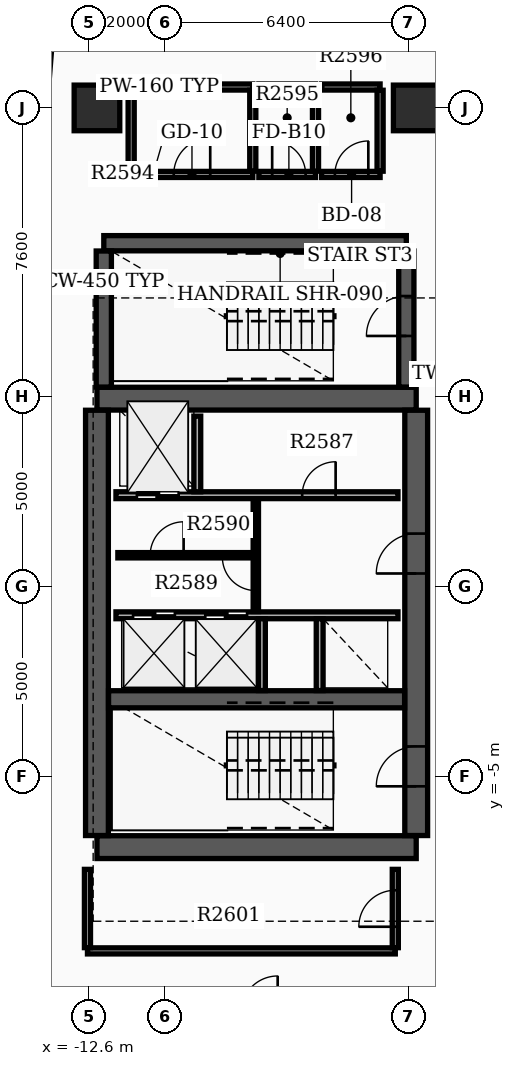
"""IFC4 building model, lengths in metres.
Left out: names, types, materials, properties, quantities, classifications, styles, units other than length and angle.
Written with IfcOpenShell. Run it as: python <this file> out.ifc"""

import sys

from ifc_helpers import new_model, si_unit, direction, frame, frame_2d, origin, origin_2d, place, context, subcontext, project, spatial, rectangle, extrude, element, fill, save


model = new_model("IFC4")
c1 = context("Model", 3, precision=1e-05, world=origin(), true_north=direction((0.0, 1.0)))
c2 = subcontext(c1, "Body", "Model", "MODEL_VIEW")
j1 = project(units=[si_unit("LENGTHUNIT", "METRE"), si_unit("PLANEANGLEUNIT", "RADIAN")], contexts=[c1])
p1 = place(None, origin())
s1 = spatial("IfcSite", under=j1, at=p1, CompositionType="ELEMENT")
p2 = place(p1, origin())
s2 = spatial("IfcBuilding", under=s1, at=p2, CompositionType="ELEMENT")
p3 = place(p2, frame((0.0, 0.0, 164.4)))
s3 = spatial("IfcBuildingStorey", under=s2, at=p3, CompositionType="ELEMENT", Elevation=164.4)
for number, where, z_axis, x_axis in (
    (1, (-12.4, -6.85, 0.0), (0.0, 0.0, 1.0), (1.0, 0.0, 0.0)),
    (2, (-12.4, 4.95, 0.0), (0.0, 0.0, 1.0), (1.0, 0.0, 0.0)),
):
    element("IfcWall", number, at=place(p3, frame(where, z_axis=z_axis, x_axis=x_axis)), inside=s3, PredefinedType="SHEAR", context=c2, shape_type="SweptSolid", body=[
        extrude(rectangle(XDim=8.4, YDim=0.6, at=frame_2d((4.2, 0.0))), origin(), (0.0, 0.0, 1.0), 3.7),
    ])
p4 = place(p3, frame((-12.4, -6.545, 0.0), z_axis=(0.0, 0.0, 1.0), x_axis=(0.0, 1.0, 0.0)))
e3 = element("IfcWall", 3, at=p4, inside=s3, PredefinedType="SHEAR", context=c2, shape_type="SweptSolid", body=[
    extrude(rectangle(XDim=11.19, YDim=0.6, at=frame_2d((5.595, 0.0))), origin(), (0.0, 0.0, 1.0), 3.7),
])
p5 = place(p3, frame((-4.0, -6.545, 0.0), z_axis=(0.0, 0.0, 1.0), x_axis=(0.0, 1.0, 0.0)))
e4 = element("IfcWall", 4, at=p5, inside=s3, PredefinedType="SHEAR", context=c2, shape_type="SweptSolid", body=[
    extrude(rectangle(XDim=11.19, YDim=0.6, at=frame_2d((5.595, 0.0))), origin(), (0.0, 0.0, 1.0), 3.7),
])
p6 = place(p5, frame((1.295, 0.0, 0.0)))
e5 = element("IfcOpeningElement", 5, at=p6, cuts=e4, PredefinedType="OPENING", context=c2, shape_type="SweptSolid", body=[
    extrude(rectangle(XDim=1.05, YDim=2.15, at=frame_2d((0.525, 1.075))), frame((0.0, 0.31, 0.0), z_axis=(0.0, -1.0, 0.0), x_axis=(1.0, 0.0, 0.0)), (0.0, 0.0, 1.0), 0.62),
])
p7 = place(p5, frame((6.895, 0.0, 0.0)))
e6 = element("IfcOpeningElement", 6, at=p7, cuts=e4, PredefinedType="OPENING", context=c2, shape_type="SweptSolid", body=[
    extrude(rectangle(XDim=1.05, YDim=2.15, at=frame_2d((0.525, 1.075))), frame((0.0, 0.31, 0.0), z_axis=(0.0, -1.0, 0.0), x_axis=(1.0, 0.0, 0.0)), (0.0, 0.0, 1.0), 0.62),
])
p8 = place(p3, frame((-12.095, -2.96, 0.0), z_axis=(0.0, 0.0, 1.0), x_axis=(1.0, 0.0, 0.0)))
e7 = element("IfcWall", 7, at=p8, inside=s3, PredefinedType="SHEAR", context=c2, shape_type="SweptSolid", body=[
    extrude(rectangle(XDim=7.79, YDim=0.45, at=frame_2d((3.895, 0.0))), origin(), (0.0, 0.0, 1.0), 3.7),
])
p9 = place(p3, frame((-12.22, 9.04, 0.0), z_axis=(0.0, 0.0, 1.0), x_axis=(1.0, 0.0, 0.0)))
e8 = element("IfcWall", 8, at=p9, inside=s3, PredefinedType="SHEAR", context=c2, shape_type="SweptSolid", body=[
    extrude(rectangle(XDim=7.96, YDim=0.4, at=frame_2d((3.98, 0.0))), origin(), (0.0, 0.0, 1.0), 3.7),
])
p10 = place(p3, frame((-12.22, 5.255, 0.0), z_axis=(0.0, 0.0, 1.0), x_axis=(0.0, 1.0, 0.0)))
e9 = element("IfcWall", 9, at=p10, inside=s3, PredefinedType="SHEAR", context=c2, shape_type="SweptSolid", body=[
    extrude(rectangle(XDim=3.58, YDim=0.4, at=frame_2d((1.79, 0.0))), origin(), (0.0, 0.0, 1.0), 3.7),
])
p11 = place(p3, frame((-4.26, 5.255, 0.0), z_axis=(0.0, 0.0, 1.0), x_axis=(0.0, 1.0, 0.0)))
e10 = element("IfcWall", 10, at=p11, inside=s3, PredefinedType="SHEAR", context=c2, shape_type="SweptSolid", body=[
    extrude(rectangle(XDim=3.58, YDim=0.4, at=frame_2d((1.79, 0.0))), origin(), (0.0, 0.0, 1.0), 3.7),
])
p12 = place(p11, frame((1.345, 0.0, 0.0)))
e11 = element("IfcOpeningElement", 11, at=p12, cuts=e10, PredefinedType="OPENING", context=c2, shape_type="SweptSolid", body=[
    extrude(rectangle(XDim=1.05, YDim=2.15, at=frame_2d((0.525, 1.075))), frame((0.0, 0.21, 0.0), z_axis=(0.0, -1.0, 0.0), x_axis=(1.0, 0.0, 0.0)), (0.0, 0.0, 1.0), 0.42),
])
for number, where, z_axis, x_axis in (
    (12, (-12.4, 12.6, 0.0), (0.0, 0.0, 1.0), (1.0, 0.0, 0.0)),
    (13, (-4.0, 12.6, 0.0), (0.0, 0.0, 1.0), (1.0, 0.0, 0.0)),
):
    element("IfcColumn", number, at=place(p3, frame(where, z_axis=z_axis, x_axis=x_axis)), inside=s3, PredefinedType="COLUMN", context=c2, shape_type="SweptSolid", body=[
        extrude(rectangle(XDim=1.2, YDim=1.2, at=origin_2d()), origin(), (0.0, 0.0, 1.0), 3.9),
    ])
p13 = place(p3, frame((-14.238, 7.721, 0.0), z_axis=(0.0, 0.0, 1.0), x_axis=(0.078438149236, 0.996918982036, 0.0)))
e14 = element("IfcWall", 14, at=p13, inside=s3, PredefinedType="STANDARD", context=c2, shape_type="SweptSolid", body=[
    extrude(rectangle(XDim=6.86, YDim=0.28, at=frame_2d((3.43, 0.0))), origin(), (0.0, 0.0, 1.0), 2.97),
])
p14 = place(p3, frame((-11.9, 2.41, 0.0), z_axis=(0.0, 0.0, 1.0), x_axis=(1.0, 0.0, 0.0)))
e15 = element("IfcWall", 15, at=p14, inside=s3, PredefinedType="SOLIDWALL", context=c2, shape_type="SweptSolid", body=[
    extrude(rectangle(XDim=7.42, YDim=0.18, at=frame_2d((3.71, 0.0))), origin(), (0.0, 0.0, 1.0), 2.96),
])
p15 = place(p14, frame((0.55, 0.0, 0.0)))
e16 = element("IfcOpeningElement", 16, at=p15, cuts=e15, PredefinedType="OPENING", context=c2, shape_type="SweptSolid", body=[
    extrude(rectangle(XDim=1.1, YDim=2.15, at=frame_2d((0.55, 1.075))), frame((0.0, 0.1, 0.0), z_axis=(0.0, -1.0, 0.0), x_axis=(1.0, 0.0, 0.0)), (0.0, 0.0, 1.0), 0.2),
])
p16 = place(p14, frame((4.9, 0.0, 0.0)))
e17 = element("IfcOpeningElement", 17, at=p16, cuts=e15, PredefinedType="OPENING", context=c2, shape_type="SweptSolid", body=[
    extrude(rectangle(XDim=0.88, YDim=2.1, at=frame_2d((0.44, 1.05))), frame((0.0, 0.1, 0.0), z_axis=(0.0, -1.0, 0.0), x_axis=(1.0, 0.0, 0.0)), (0.0, 0.0, 1.0), 0.2),
])
p17 = place(p3, frame((-11.9, -0.75, 0.0), z_axis=(0.0, 0.0, 1.0), x_axis=(1.0, 0.0, 0.0)))
e18 = element("IfcWall", 18, at=p17, inside=s3, PredefinedType="SOLIDWALL", context=c2, shape_type="SweptSolid", body=[
    extrude(rectangle(XDim=7.42, YDim=0.18, at=frame_2d((3.71, 0.0))), origin(), (0.0, 0.0, 1.0), 2.96),
])
p18 = place(p17, frame((0.45, 0.0, 0.0)))
e19 = element("IfcOpeningElement", 19, at=p18, cuts=e18, PredefinedType="OPENING", context=c2, shape_type="SweptSolid", body=[
    extrude(rectangle(XDim=1.1, YDim=2.15, at=frame_2d((0.55, 1.075))), frame((0.0, 0.1, 0.0), z_axis=(0.0, -1.0, 0.0), x_axis=(1.0, 0.0, 0.0)), (0.0, 0.0, 1.0), 0.2),
])
p19 = place(p17, frame((2.35, 0.0, 0.0)))
e20 = element("IfcOpeningElement", 20, at=p19, cuts=e18, PredefinedType="OPENING", context=c2, shape_type="SweptSolid", body=[
    extrude(rectangle(XDim=1.1, YDim=2.15, at=frame_2d((0.55, 1.075))), frame((0.0, 0.1, 0.0), z_axis=(0.0, -1.0, 0.0), x_axis=(1.0, 0.0, 0.0)), (0.0, 0.0, 1.0), 0.2),
])
p20 = place(p3, frame((-9.76, 2.5, 0.0), z_axis=(0.0, 0.0, 1.0), x_axis=(0.0, 1.0, 0.0)))
e21 = element("IfcWall", 21, at=p20, inside=s3, PredefinedType="SOLIDWALL", context=c2, shape_type="SweptSolid", body=[
    extrude(rectangle(XDim=1.99, YDim=0.18, at=frame_2d((0.995, 0.0))), origin(), (0.0, 0.0, 1.0), 2.96),
])
for number, where, z_axis, x_axis in (
    (22, (-8.06, -2.73, 0.0), (0.0, 0.0, 1.0), (0.0, 1.0, 0.0)),
    (23, (-6.54, -2.73, 0.0), (0.0, 0.0, 1.0), (0.0, 1.0, 0.0)),
):
    element("IfcWall", number, at=place(p3, frame(where, z_axis=z_axis, x_axis=x_axis)), inside=s3, PredefinedType="SOLIDWALL", context=c2, shape_type="SweptSolid", body=[
        extrude(rectangle(XDim=1.89, YDim=0.18, at=frame_2d((0.945, 0.0))), origin(), (0.0, 0.0, 1.0), 2.96),
    ])
p21 = place(p3, frame((-8.22, -0.65, 0.0), z_axis=(0.0, 0.0, 1.0), x_axis=(0.0, 1.0, 0.0)))
e24 = element("IfcWall", 24, at=p21, inside=s3, PredefinedType="SOLIDWALL", context=c2, shape_type="SweptSolid", body=[
    extrude(rectangle(XDim=2.96, YDim=0.14, at=frame_2d((1.48, 0.0))), origin(), (0.0, 0.0, 1.0), 2.96),
])
p22 = place(p21, frame((0.55, 0.0, 0.0)))
e25 = element("IfcOpeningElement", 25, at=p22, cuts=e24, PredefinedType="OPENING", context=c2, shape_type="SweptSolid", body=[
    extrude(rectangle(XDim=0.88, YDim=2.1, at=frame_2d((0.44, 1.05))), frame((0.0, 0.08, 0.0), z_axis=(0.0, -1.0, 0.0), x_axis=(1.0, 0.0, 0.0)), (0.0, 0.0, 1.0), 0.16),
])
p23 = place(p3, frame((-11.85, 0.83, 0.0), z_axis=(0.0, 0.0, 1.0), x_axis=(1.0, 0.0, 0.0)))
e26 = element("IfcWall", 26, at=p23, inside=s3, PredefinedType="PARTITIONING", context=c2, shape_type="SweptSolid", body=[
    extrude(rectangle(XDim=3.552, YDim=0.14, at=frame_2d((1.776, 0.0))), origin(), (0.0, 0.0, 1.0), 2.96),
])
p24 = place(p23, frame((0.85, 0.0, 0.0)))
e27 = element("IfcOpeningElement", 27, at=p24, cuts=e26, PredefinedType="OPENING", context=c2, shape_type="SweptSolid", body=[
    extrude(rectangle(XDim=0.88, YDim=2.1, at=frame_2d((0.44, 1.05))), frame((0.0, 0.08, 0.0), z_axis=(0.0, -1.0, 0.0), x_axis=(1.0, 0.0, 0.0)), (0.0, 0.0, 1.0), 0.16),
])
p25 = place(p3, frame((-11.5, 10.85, 0.0), z_axis=(0.0, 0.0, 1.0), x_axis=(1.0, 0.0, 0.0)))
e28 = element("IfcWall", 28, at=p25, inside=s3, PredefinedType="PARTITIONING", context=c2, shape_type="SweptSolid", body=[
    extrude(rectangle(XDim=3.2, YDim=0.16, at=frame_2d((1.6, 0.0))), origin(), (0.0, 0.0, 1.0), 2.96),
])
p26 = place(p25, frame((1.12, 0.0, 0.0)))
e29 = element("IfcOpeningElement", 29, at=p26, cuts=e28, PredefinedType="OPENING", context=c2, shape_type="SweptSolid", body=[
    extrude(rectangle(XDim=0.96, YDim=2.15, at=frame_2d((0.48, 1.075))), frame((0.0, 0.09, 0.0), z_axis=(0.0, -1.0, 0.0), x_axis=(1.0, 0.0, 0.0)), (0.0, 0.0, 1.0), 0.18),
])
p27 = place(p3, frame((-11.5, 13.15, 0.0), z_axis=(0.0, 0.0, 1.0), x_axis=(1.0, 0.0, 0.0)))
e30 = element("IfcWall", 30, at=p27, inside=s3, PredefinedType="PARTITIONING", context=c2, shape_type="SweptSolid", body=[
    extrude(rectangle(XDim=3.2, YDim=0.16, at=frame_2d((1.6, 0.0))), origin(), (0.0, 0.0, 1.0), 2.96),
])
for number, where, z_axis, x_axis in (
    (31, (-11.5, 10.935, 0.0), (0.0, 0.0, 1.0), (0.0, 1.0, 0.0)),
    (32, (-8.3, 10.935, 0.0), (0.0, 0.0, 1.0), (0.0, 1.0, 0.0)),
):
    element("IfcWall", number, at=place(p3, frame(where, z_axis=z_axis, x_axis=x_axis)), inside=s3, PredefinedType="PARTITIONING", context=c2, shape_type="SweptSolid", body=[
        extrude(rectangle(XDim=2.13, YDim=0.16, at=frame_2d((1.065, 0.0))), origin(), (0.0, 0.0, 1.0), 2.96),
    ])
p28 = place(p3, frame((-8.14, 10.85, 0.0), z_axis=(0.0, 0.0, 1.0), x_axis=(1.0, 0.0, 0.0)))
e33 = element("IfcWall", 33, at=p28, inside=s3, PredefinedType="PARTITIONING", context=c2, shape_type="SweptSolid", body=[
    extrude(rectangle(XDim=1.49, YDim=0.16, at=frame_2d((0.745, 0.0))), origin(), (0.0, 0.0, 1.0), 2.96),
])
p29 = place(p28, frame((0.35, 0.0, 0.0)))
e34 = element("IfcOpeningElement", 34, at=p29, cuts=e33, PredefinedType="OPENING", context=c2, shape_type="SweptSolid", body=[
    extrude(rectangle(XDim=0.88, YDim=2.1, at=frame_2d((0.44, 1.05))), frame((0.0, 0.09, 0.0), z_axis=(0.0, -1.0, 0.0), x_axis=(1.0, 0.0, 0.0)), (0.0, 0.0, 1.0), 0.18),
])
p30 = place(p3, frame((-8.14, 13.15, 0.0), z_axis=(0.0, 0.0, 1.0), x_axis=(1.0, 0.0, 0.0)))
e35 = element("IfcWall", 35, at=p30, inside=s3, PredefinedType="PARTITIONING", context=c2, shape_type="SweptSolid", body=[
    extrude(rectangle(XDim=1.49, YDim=0.16, at=frame_2d((0.745, 0.0))), origin(), (0.0, 0.0, 1.0), 2.96),
])
p31 = place(p3, frame((-6.65, 10.935, 0.0), z_axis=(0.0, 0.0, 1.0), x_axis=(0.0, 1.0, 0.0)))
e36 = element("IfcWall", 36, at=p31, inside=s3, PredefinedType="PARTITIONING", context=c2, shape_type="SweptSolid", body=[
    extrude(rectangle(XDim=2.13, YDim=0.16, at=frame_2d((1.065, 0.0))), origin(), (0.0, 0.0, 1.0), 2.96),
])
p32 = place(p3, frame((-6.49, 10.85, 0.0), z_axis=(0.0, 0.0, 1.0), x_axis=(1.0, 0.0, 0.0)))
e37 = element("IfcWall", 37, at=p32, inside=s3, PredefinedType="PARTITIONING", context=c2, shape_type="SweptSolid", body=[
    extrude(rectangle(XDim=1.54, YDim=0.16, at=frame_2d((0.77, 0.0))), origin(), (0.0, 0.0, 1.0), 2.96),
])
p33 = place(p32, frame((0.35, 0.0, 0.0)))
e38 = element("IfcOpeningElement", 38, at=p33, cuts=e37, PredefinedType="OPENING", context=c2, shape_type="SweptSolid", body=[
    extrude(rectangle(XDim=0.88, YDim=2.15, at=frame_2d((0.44, 1.075))), frame((0.0, 0.09, 0.0), z_axis=(0.0, -1.0, 0.0), x_axis=(1.0, 0.0, 0.0)), (0.0, 0.0, 1.0), 0.18),
])
p34 = place(p3, frame((-6.49, 13.15, 0.0), z_axis=(0.0, 0.0, 1.0), x_axis=(1.0, 0.0, 0.0)))
e39 = element("IfcWall", 39, at=p34, inside=s3, PredefinedType="PARTITIONING", context=c2, shape_type="SweptSolid", body=[
    extrude(rectangle(XDim=1.54, YDim=0.16, at=frame_2d((0.77, 0.0))), origin(), (0.0, 0.0, 1.0), 2.96),
])
p35 = place(p3, frame((-4.95, 10.935, 0.0), z_axis=(0.0, 0.0, 1.0), x_axis=(0.0, 1.0, 0.0)))
e40 = element("IfcWall", 40, at=p35, inside=s3, PredefinedType="PARTITIONING", context=c2, shape_type="SweptSolid", body=[
    extrude(rectangle(XDim=2.13, YDim=0.16, at=frame_2d((1.065, 0.0))), origin(), (0.0, 0.0, 1.0), 2.96),
])
p36 = place(p3, frame((-12.65, -9.58, 0.0), z_axis=(0.0, 0.0, 1.0), x_axis=(1.0, 0.0, 0.0)))
e41 = element("IfcWall", 41, at=p36, inside=s3, PredefinedType="PARTITIONING", context=c2, shape_type="SweptSolid", body=[
    extrude(rectangle(XDim=8.1, YDim=0.16, at=frame_2d((4.05, 0.0))), origin(), (0.0, 0.0, 1.0), 2.96),
])
p37 = place(p3, frame((-12.65, -9.495, 0.0), z_axis=(0.0, 0.0, 1.0), x_axis=(0.0, 1.0, 0.0)))
e42 = element("IfcWall", 42, at=p37, inside=s3, PredefinedType="PARTITIONING", context=c2, shape_type="SweptSolid", body=[
    extrude(rectangle(XDim=2.06, YDim=0.16, at=frame_2d((1.03, 0.0))), origin(), (0.0, 0.0, 1.0), 2.96),
])
p38 = place(p3, frame((-4.55, -9.495, 0.0), z_axis=(0.0, 0.0, 1.0), x_axis=(0.0, 1.0, 0.0)))
e43 = element("IfcWall", 43, at=p38, inside=s3, PredefinedType="PARTITIONING", context=c2, shape_type="SweptSolid", body=[
    extrude(rectangle(XDim=2.06, YDim=0.16, at=frame_2d((1.03, 0.0))), origin(), (0.0, 0.0, 1.0), 2.96),
])
p39 = place(p38, frame((0.55, 0.0, 0.0)))
e44 = element("IfcOpeningElement", 44, at=p39, cuts=e43, PredefinedType="OPENING", context=c2, shape_type="SweptSolid", body=[
    extrude(rectangle(XDim=0.96, YDim=2.15, at=frame_2d((0.48, 1.075))), frame((0.0, 0.09, 0.0), z_axis=(0.0, -1.0, 0.0), x_axis=(1.0, 0.0, 0.0)), (0.0, 0.0, 1.0), 0.18),
])
p40 = place(p6, origin())
e45 = element("IfcDoor", 45, at=p40, inside=s3, OperationType="SINGLE_SWING_LEFT", PredefinedType="DOOR", context=c2, shape_type="SweptSolid", body=[
    extrude(rectangle(XDim=1.05, YDim=2.15, at=frame_2d((0.525, 1.075))), frame((0.0, 0.025, 0.0), z_axis=(0.0, -1.0, 0.0), x_axis=(1.0, 0.0, 0.0)), (0.0, 0.0, 1.0), 0.05),
])
fill(e5, e45)
p41 = place(p7, origin())
e46 = element("IfcDoor", 46, at=p41, inside=s3, OperationType="SINGLE_SWING_LEFT", PredefinedType="DOOR", context=c2, shape_type="SweptSolid", body=[
    extrude(rectangle(XDim=1.05, YDim=2.15, at=frame_2d((0.525, 1.075))), frame((0.0, 0.025, 0.0), z_axis=(0.0, -1.0, 0.0), x_axis=(1.0, 0.0, 0.0)), (0.0, 0.0, 1.0), 0.05),
])
fill(e6, e46)
p42 = place(p12, origin())
e47 = element("IfcDoor", 47, at=p42, inside=s3, OperationType="SINGLE_SWING_LEFT", PredefinedType="DOOR", context=c2, shape_type="SweptSolid", body=[
    extrude(rectangle(XDim=1.05, YDim=2.15, at=frame_2d((0.525, 1.075))), frame((0.0, 0.025, 0.0), z_axis=(0.0, -1.0, 0.0), x_axis=(1.0, 0.0, 0.0)), (0.0, 0.0, 1.0), 0.05),
])
fill(e11, e47)
p43 = place(p15, origin())
e48 = element("IfcDoor", 48, at=p43, inside=s3, OperationType="DOUBLE_DOOR_SLIDING", PredefinedType="DOOR", context=c2, shape_type="SweptSolid", body=[
    extrude(rectangle(XDim=1.1, YDim=2.15, at=frame_2d((0.55, 1.075))), frame((0.0, 0.025, 0.0), z_axis=(0.0, -1.0, 0.0), x_axis=(1.0, 0.0, 0.0)), (0.0, 0.0, 1.0), 0.05),
])
fill(e16, e48)
p44 = place(p18, origin())
e49 = element("IfcDoor", 49, at=p44, inside=s3, OperationType="DOUBLE_DOOR_SLIDING", PredefinedType="DOOR", context=c2, shape_type="SweptSolid", body=[
    extrude(rectangle(XDim=1.1, YDim=2.15, at=frame_2d((0.55, 1.075))), frame((0.0, 0.025, 0.0), z_axis=(0.0, -1.0, 0.0), x_axis=(1.0, 0.0, 0.0)), (0.0, 0.0, 1.0), 0.05),
])
fill(e19, e49)
p45 = place(p19, origin())
e50 = element("IfcDoor", 50, at=p45, inside=s3, OperationType="DOUBLE_DOOR_SLIDING", PredefinedType="DOOR", context=c2, shape_type="SweptSolid", body=[
    extrude(rectangle(XDim=1.1, YDim=2.15, at=frame_2d((0.55, 1.075))), frame((0.0, 0.025, 0.0), z_axis=(0.0, -1.0, 0.0), x_axis=(1.0, 0.0, 0.0)), (0.0, 0.0, 1.0), 0.05),
])
fill(e20, e50)
p46 = place(p16, origin())
e51 = element("IfcDoor", 51, at=p46, inside=s3, OperationType="SINGLE_SWING_RIGHT", PredefinedType="DOOR", context=c2, shape_type="SweptSolid", body=[
    extrude(rectangle(XDim=0.88, YDim=2.1, at=frame_2d((0.44, 1.05))), frame((0.0, 0.025, 0.0), z_axis=(0.0, -1.0, 0.0), x_axis=(1.0, 0.0, 0.0)), (0.0, 0.0, 1.0), 0.05),
])
fill(e17, e51)
p47 = place(p22, origin())
e52 = element("IfcDoor", 52, at=p47, inside=s3, OperationType="SINGLE_SWING_RIGHT", PredefinedType="DOOR", context=c2, shape_type="SweptSolid", body=[
    extrude(rectangle(XDim=0.88, YDim=2.1, at=frame_2d((0.44, 1.05))), frame((0.0, 0.025, 0.0), z_axis=(0.0, -1.0, 0.0), x_axis=(1.0, 0.0, 0.0)), (0.0, 0.0, 1.0), 0.05),
])
fill(e25, e52)
p48 = place(p24, origin())
e53 = element("IfcDoor", 53, at=p48, inside=s3, OperationType="SINGLE_SWING_RIGHT", PredefinedType="DOOR", context=c2, shape_type="SweptSolid", body=[
    extrude(rectangle(XDim=0.88, YDim=2.1, at=frame_2d((0.44, 1.05))), frame((0.0, 0.025, 0.0), z_axis=(0.0, -1.0, 0.0), x_axis=(1.0, 0.0, 0.0)), (0.0, 0.0, 1.0), 0.05),
])
fill(e27, e53)
p49 = place(p26, origin())
e54 = element("IfcDoor", 54, at=p49, inside=s3, OperationType="SINGLE_SWING_RIGHT", PredefinedType="DOOR", context=c2, shape_type="SweptSolid", body=[
    extrude(rectangle(XDim=0.96, YDim=2.15, at=frame_2d((0.48, 1.075))), frame((0.0, 0.025, 0.0), z_axis=(0.0, -1.0, 0.0), x_axis=(1.0, 0.0, 0.0)), (0.0, 0.0, 1.0), 0.05),
])
fill(e29, e54)
p50 = place(p29, origin())
e55 = element("IfcDoor", 55, at=p50, inside=s3, OperationType="SINGLE_SWING_LEFT", PredefinedType="DOOR", context=c2, shape_type="SweptSolid", body=[
    extrude(rectangle(XDim=0.88, YDim=2.1, at=frame_2d((0.44, 1.05))), frame((0.0, 0.025, 0.0), z_axis=(0.0, -1.0, 0.0), x_axis=(1.0, 0.0, 0.0)), (0.0, 0.0, 1.0), 0.05),
])
fill(e34, e55)
p51 = place(p33, origin())
e56 = element("IfcDoor", 56, at=p51, inside=s3, OperationType="SINGLE_SWING_RIGHT", PredefinedType="DOOR", context=c2, shape_type="SweptSolid", body=[
    extrude(rectangle(XDim=0.88, YDim=2.15, at=frame_2d((0.44, 1.075))), frame((0.0, 0.025, 0.0), z_axis=(0.0, -1.0, 0.0), x_axis=(1.0, 0.0, 0.0)), (0.0, 0.0, 1.0), 0.05),
])
fill(e38, e56)
p52 = place(p39, origin())
e57 = element("IfcDoor", 57, at=p52, inside=s3, OperationType="SINGLE_SWING_LEFT", PredefinedType="DOOR", context=c2, shape_type="SweptSolid", body=[
    extrude(rectangle(XDim=0.96, YDim=2.15, at=frame_2d((0.48, 1.075))), frame((0.0, 0.025, 0.0), z_axis=(0.0, -1.0, 0.0), x_axis=(1.0, 0.0, 0.0)), (0.0, 0.0, 1.0), 0.05),
])
fill(e44, e57)
save(model, sys.argv[1])
